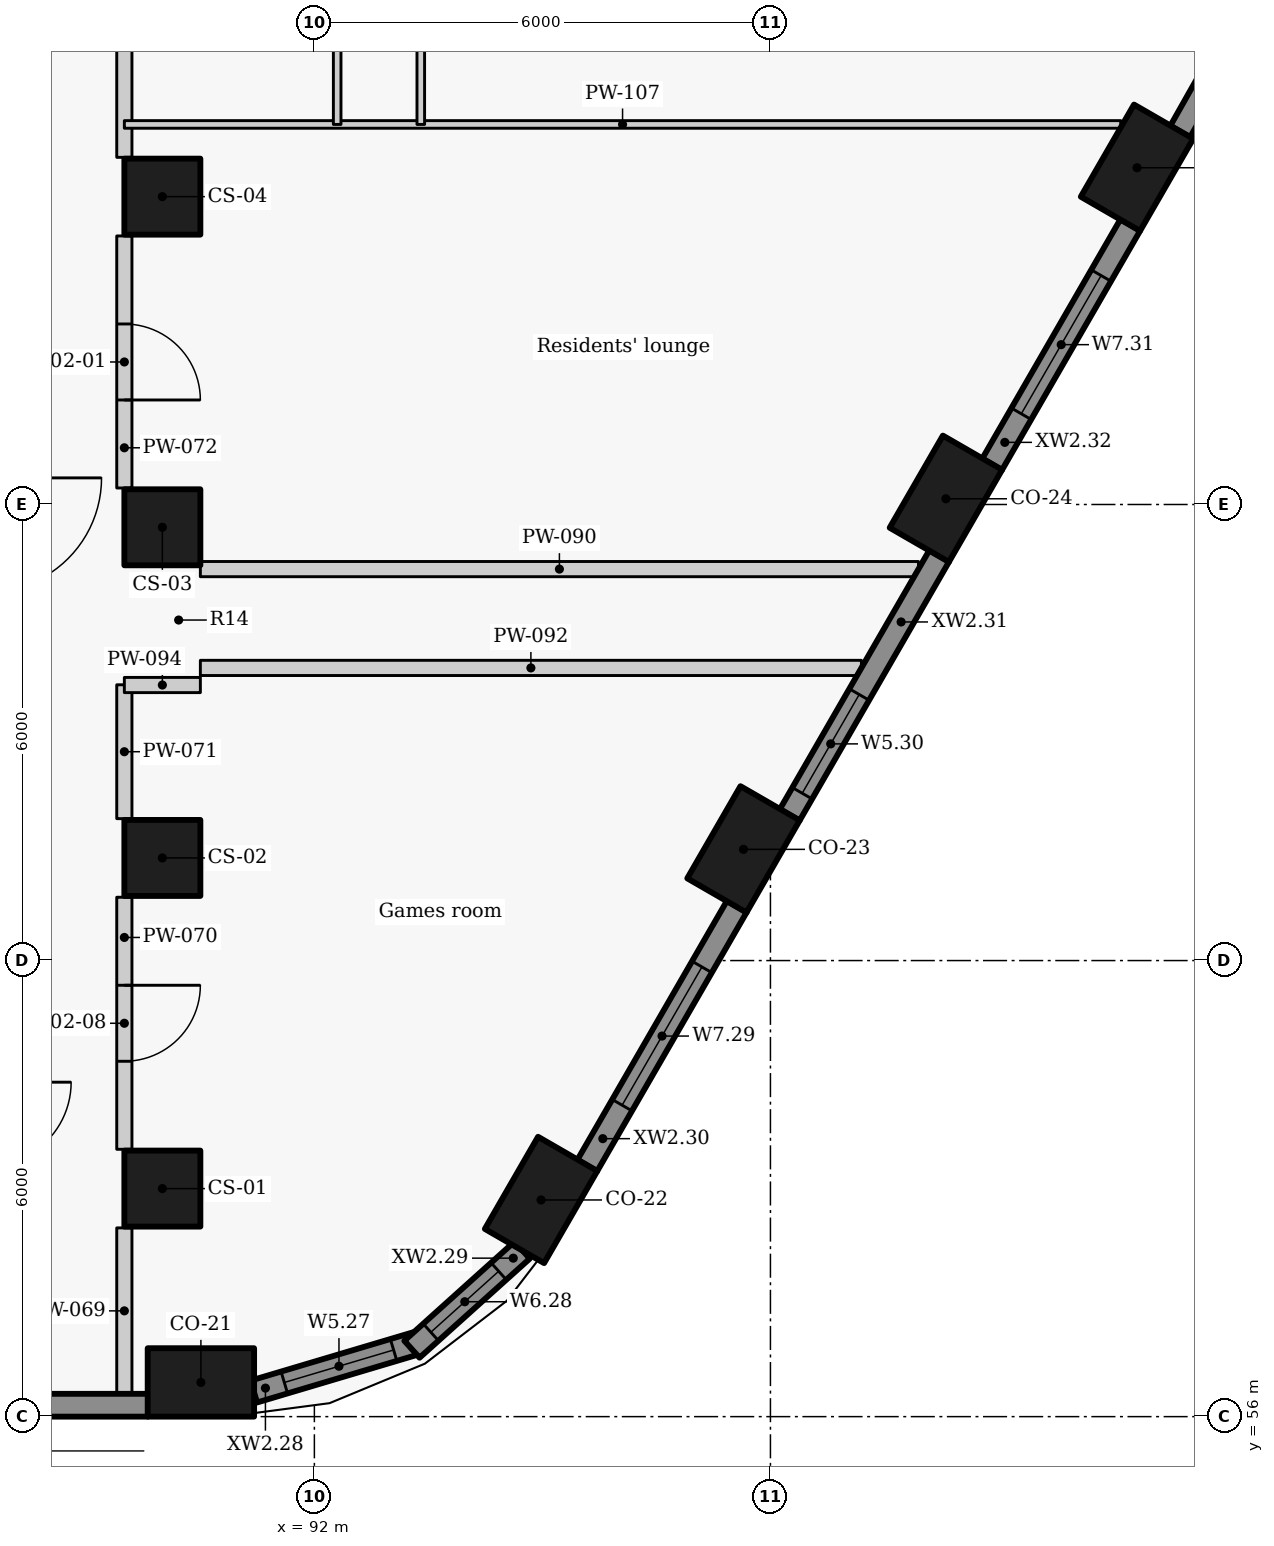
"""IFC4 building model, lengths in metres.
Left out: names, types, materials, properties, quantities, classifications, styles, units other than length and angle.
Written with IfcOpenShell. Run it as: python <this file> out.ifc"""

import sys

from ifc_helpers import new_model, si_unit, direction, frame, frame_2d, origin, origin_2d, place, context, subcontext, project, spatial, rectangle, extrude, element, fill, save


model = new_model("IFC4")
c1 = context("Model", 3, precision=1e-05, world=origin(), true_north=direction((0.0, 1.0)))
c2 = subcontext(c1, "Body", "Model", "MODEL_VIEW")
j1 = project(units=[si_unit("LENGTHUNIT", "METRE"), si_unit("PLANEANGLEUNIT", "RADIAN")], contexts=[c1])
p1 = place(None, origin())
s1 = spatial("IfcSite", under=j1, at=p1, CompositionType="ELEMENT")
p2 = place(p1, origin())
s2 = spatial("IfcBuilding", under=s1, at=p2, CompositionType="ELEMENT")
p3 = place(p2, frame((0.0, 0.0, 77.7)))
s3 = spatial("IfcBuildingStorey", under=s2, at=p3, CompositionType="ELEMENT", Elevation=77.7)
for number, where, z_axis, x_axis in (
    (1, (90.507, 56.45, 0.0), (0.0, 0.0, 1.0), (1.0, 0.0, 0.0)),
    (2, (94.982, 58.851, 0.0), (0.0, 0.0, 1.0), (0.5, 0.866, 0.0)),
    (3, (97.646, 63.463, 0.0), (0.0, 0.0, 1.0), (0.5, 0.866, 0.0)),
    (4, (100.308, 68.075, 0.0), (0.0, 0.0, 1.0), (0.5, 0.866, 0.0)),
    (5, (102.823, 72.43, 0.0), (0.0, 0.0, 1.0), (0.5, 0.866, 0.0)),
):
    element("IfcColumn", number, at=place(p3, frame(where, z_axis=z_axis, x_axis=x_axis)), inside=s3, PredefinedType="COLUMN", context=c2, shape_type="SweptSolid", body=[
        extrude(rectangle(XDim=1.4, YDim=0.9, at=origin_2d()), origin(), (0.0, 0.0, 1.0), 3.3),
    ])
for number, where, z_axis, x_axis in (
    (6, (90.0, 59.0, 0.0), (0.0, 0.0, 1.0), (0.0, 1.0, 0.0)),
    (7, (90.0, 63.35, 0.0), (0.0, 0.0, 1.0), (0.0, 1.0, 0.0)),
    (8, (90.0, 67.7, 0.0), (0.0, 0.0, 1.0), (0.0, 1.0, 0.0)),
    (9, (90.0, 72.05, 0.0), (0.0, 0.0, 1.0), (0.0, 1.0, 0.0)),
):
    element("IfcColumn", number, at=place(p3, frame(where, z_axis=z_axis, x_axis=x_axis)), inside=s3, PredefinedType="COLUMN", context=c2, shape_type="SweptSolid", body=[
        extrude(rectangle(XDim=1.0, YDim=1.0, at=origin_2d()), origin(), (0.0, 0.0, 1.0), 3.3),
    ])
p4 = place(p3, frame((69.871, 56.15, 0.0), z_axis=(0.0, 0.0, 1.0), x_axis=(1.0, 0.0, 0.0)))
e10 = element("IfcWall", 10, at=p4, inside=s3, PredefinedType="SOLIDWALL", context=c2, shape_type="SweptSolid", body=[
    extrude(rectangle(XDim=19.94, YDim=0.3, at=frame_2d((9.97, 0.0))), origin(), (0.0, 0.0, 1.0), 2.425),
])
p5 = place(p3, frame((91.203, 56.33, 0.0), z_axis=(0.0, 0.0, 1.0), x_axis=(0.95847736903, 0.285168604614, 0.0)))
e11 = element("IfcWall", 11, at=p5, inside=s3, PredefinedType="SOLIDWALL", context=c2, shape_type="SweptSolid", body=[
    extrude(rectangle(XDim=2.262, YDim=0.3, at=frame_2d((1.131, 0.0))), origin(), (0.0, 0.0, 1.0), 2.425),
])
p6 = place(p5, frame((0.419, 0.0, 0.9)))
e12 = element("IfcOpeningElement", 12, at=p6, cuts=e11, PredefinedType="OPENING", context=c2, shape_type="SweptSolid", body=[
    extrude(rectangle(XDim=1.5, YDim=1.1, at=frame_2d((0.75, 0.55))), frame((0.0, 0.16, 0.0), z_axis=(0.0, -1.0, 0.0), x_axis=(1.0, 0.0, 0.0)), (0.0, 0.0, 1.0), 0.32),
])
p7 = place(p3, frame((93.283, 56.887, 0.0), z_axis=(0.0, 0.0, 1.0), x_axis=(0.743785734967, 0.668418117992, 0.0)))
e13 = element("IfcWall", 13, at=p7, inside=s3, PredefinedType="SOLIDWALL", context=c2, shape_type="SweptSolid", body=[
    extrude(rectangle(XDim=1.95, YDim=0.3, at=frame_2d((0.975, 0.0))), origin(), (0.0, 0.0, 1.0), 2.425),
])
p8 = place(p7, frame((0.335, 0.0, 0.9)))
e14 = element("IfcOpeningElement", 14, at=p8, cuts=e13, PredefinedType="OPENING", context=c2, shape_type="SweptSolid", body=[
    extrude(rectangle(XDim=1.2, YDim=1.1, at=frame_2d((0.6, 0.55))), frame((0.0, 0.16, 0.0), z_axis=(0.0, -1.0, 0.0), x_axis=(1.0, 0.0, 0.0)), (0.0, 0.0, 1.0), 0.32),
])
p9 = place(p3, frame((95.59, 59.303, 0.0), z_axis=(0.0, 0.0, 1.0), x_axis=(0.500003583557, 0.866023334807, 0.0)))
e15 = element("IfcWall", 15, at=p9, inside=s3, PredefinedType="SOLIDWALL", context=c2, shape_type="SweptSolid", body=[
    extrude(rectangle(XDim=3.934, YDim=0.3, at=frame_2d((1.967, 0.0))), origin(), (0.0, 0.0, 1.0), 2.425),
])
p10 = place(p9, frame((0.917, 0.0, 0.9)))
e16 = element("IfcOpeningElement", 16, at=p10, cuts=e15, PredefinedType="OPENING", context=c2, shape_type="SweptSolid", body=[
    extrude(rectangle(XDim=2.1, YDim=1.1, at=frame_2d((1.05, 0.55))), frame((0.0, 0.16, 0.0), z_axis=(0.0, -1.0, 0.0), x_axis=(1.0, 0.0, 0.0)), (0.0, 0.0, 1.0), 0.32),
])
p11 = place(p3, frame((98.253, 63.916, 0.0), z_axis=(0.0, 0.0, 1.0), x_axis=(0.499957037901, 0.866050206543, 0.0)))
e17 = element("IfcWall", 17, at=p11, inside=s3, PredefinedType="SOLIDWALL", context=c2, shape_type="SweptSolid", body=[
    extrude(rectangle(XDim=3.934, YDim=0.3, at=frame_2d((1.967, 0.0))), origin(), (0.0, 0.0, 1.0), 2.425),
])
p12 = place(p11, frame((0.33, 0.0, 0.9)))
e18 = element("IfcOpeningElement", 18, at=p12, cuts=e17, PredefinedType="OPENING", context=c2, shape_type="SweptSolid", body=[
    extrude(rectangle(XDim=1.5, YDim=1.1, at=frame_2d((0.75, 0.55))), frame((0.0, 0.16, 0.0), z_axis=(0.0, -1.0, 0.0), x_axis=(1.0, 0.0, 0.0)), (0.0, 0.0, 1.0), 0.32),
])
p13 = place(p3, frame((100.916, 68.528, 0.0), z_axis=(0.0, 0.0, 1.0), x_axis=(0.500009139881, 0.866020126807, 0.0)))
e19 = element("IfcWall", 19, at=p13, inside=s3, PredefinedType="SOLIDWALL", context=c2, shape_type="SweptSolid", body=[
    extrude(rectangle(XDim=3.637, YDim=0.3, at=frame_2d((1.818, 0.0))), origin(), (0.0, 0.0, 1.0), 2.425),
])
p14 = place(p13, frame((0.768, 0.0, 0.9)))
e20 = element("IfcOpeningElement", 20, at=p14, cuts=e19, PredefinedType="OPENING", context=c2, shape_type="SweptSolid", body=[
    extrude(rectangle(XDim=2.1, YDim=1.1, at=frame_2d((1.05, 0.55))), frame((0.0, 0.16, 0.0), z_axis=(0.0, -1.0, 0.0), x_axis=(1.0, 0.0, 0.0)), (0.0, 0.0, 1.0), 0.32),
])
p15 = place(p3, frame((103.391, 72.906, 0.0), z_axis=(0.0, 0.0, 1.0), x_axis=(0.492456858874, 0.870336855561, 0.0)))
e21 = element("IfcWall", 21, at=p15, inside=s3, PredefinedType="SOLIDWALL", context=c2, shape_type="SweptSolid", body=[
    extrude(rectangle(XDim=5.677, YDim=0.3, at=frame_2d((2.838, 0.0))), origin(), (0.0, 0.0, 1.0), 2.425),
])
p16 = place(p15, frame((1.498, 0.0, 0.9)))
e22 = element("IfcOpeningElement", 22, at=p16, cuts=e21, PredefinedType="OPENING", context=c2, shape_type="SweptSolid", body=[
    extrude(rectangle(XDim=2.1, YDim=1.1, at=frame_2d((1.05, 0.55))), frame((0.0, 0.16, 0.0), z_axis=(0.0, -1.0, 0.0), x_axis=(1.0, 0.0, 0.0)), (0.0, 0.0, 1.0), 0.32),
])
p17 = place(p3, frame((89.5, 56.3, 0.0), z_axis=(0.0, 0.0, 1.0), x_axis=(0.0, 1.0, 0.0)))
e23 = element("IfcWall", 23, at=p17, inside=s3, PredefinedType="PARTITIONING", context=c2, shape_type="SweptSolid", body=[
    extrude(rectangle(XDim=2.183, YDim=0.2, at=frame_2d((1.091, 0.0))), origin(), (0.0, 0.0, 1.0), 3.025),
])
p18 = place(p3, frame((89.5, 62.833, 0.0), z_axis=(0.0, 0.0, 1.0), x_axis=(0.0, -1.0, 0.0)))
e24 = element("IfcWall", 24, at=p18, inside=s3, PredefinedType="PARTITIONING", context=c2, shape_type="SweptSolid", body=[
    extrude(rectangle(XDim=3.316, YDim=0.2, at=frame_2d((1.658, 0.0))), origin(), (0.0, 0.0, 1.0), 3.025),
])
p19 = place(p18, frame((1.158, 0.0, 0.0)))
e25 = element("IfcOpeningElement", 25, at=p19, cuts=e24, PredefinedType="OPENING", context=c2, shape_type="SweptSolid", body=[
    extrude(rectangle(XDim=1.0, YDim=2.1, at=frame_2d((0.5, 1.05))), frame((0.0, 0.11, 0.0), z_axis=(0.0, -1.0, 0.0), x_axis=(1.0, 0.0, 0.0)), (0.0, 0.0, 1.0), 0.22),
])
p20 = place(p3, frame((89.5, 63.867, 0.0), z_axis=(0.0, 0.0, 1.0), x_axis=(0.0, 1.0, 0.0)))
e26 = element("IfcWall", 26, at=p20, inside=s3, PredefinedType="PARTITIONING", context=c2, shape_type="SweptSolid", body=[
    extrude(rectangle(XDim=1.761, YDim=0.2, at=frame_2d((0.88, 0.0))), origin(), (0.0, 0.0, 1.0), 3.025),
])
p21 = place(p3, frame((89.5, 71.533, 0.0), z_axis=(0.0, 0.0, 1.0), x_axis=(0.0, -1.0, 0.0)))
e27 = element("IfcWall", 27, at=p21, inside=s3, PredefinedType="PARTITIONING", context=c2, shape_type="SweptSolid", body=[
    extrude(rectangle(XDim=3.316, YDim=0.2, at=frame_2d((1.658, 0.0))), origin(), (0.0, 0.0, 1.0), 3.025),
])
p22 = place(p21, frame((1.158, 0.0, 0.0)))
e28 = element("IfcOpeningElement", 28, at=p22, cuts=e27, PredefinedType="OPENING", context=c2, shape_type="SweptSolid", body=[
    extrude(rectangle(XDim=1.0, YDim=2.1, at=frame_2d((0.5, 1.05))), frame((0.0, 0.11, 0.0), z_axis=(0.0, -1.0, 0.0), x_axis=(1.0, 0.0, 0.0)), (0.0, 0.0, 1.0), 0.22),
])
p23 = place(p3, frame((89.5, 72.567, 0.0), z_axis=(0.0, 0.0, 1.0), x_axis=(0.0, 1.0, 0.0)))
e29 = element("IfcWall", 29, at=p23, inside=s3, PredefinedType="PARTITIONING", context=c2, shape_type="SweptSolid", body=[
    extrude(rectangle(XDim=4.266, YDim=0.2, at=frame_2d((2.133, 0.0))), origin(), (0.0, 0.0, 1.0), 3.025),
])
p24 = place(p3, frame((90.5, 67.15, 0.0), z_axis=(0.0, 0.0, 1.0), x_axis=(1.0, 0.0, 0.0)))
e30 = element("IfcWall", 30, at=p24, inside=s3, PredefinedType="PARTITIONING", context=c2, shape_type="SweptSolid", body=[
    extrude(rectangle(XDim=9.448, YDim=0.2, at=frame_2d((4.724, 0.0))), origin(), (0.0, 0.0, 1.0), 2.405),
])
p25 = place(p3, frame((90.5, 65.85, 0.0), z_axis=(0.0, 0.0, 1.0), x_axis=(1.0, 0.0, 0.0)))
e31 = element("IfcWall", 31, at=p25, inside=s3, PredefinedType="PARTITIONING", context=c2, shape_type="SweptSolid", body=[
    extrude(rectangle(XDim=8.697, YDim=0.2, at=frame_2d((4.349, 0.0))), origin(), (0.0, 0.0, 1.0), 2.405),
])
p26 = place(p3, frame((89.5, 65.625, 0.0), z_axis=(0.0, 0.0, 1.0), x_axis=(1.0, 0.0, 0.0)))
e32 = element("IfcWall", 32, at=p26, inside=s3, PredefinedType="PARTITIONING", context=c2, shape_type="SweptSolid", body=[
    extrude(rectangle(XDim=1.0, YDim=0.2, at=frame_2d((0.5, 0.0))), origin(), (0.0, 0.0, 1.0), 2.505),
])
p27 = place(p3, frame((89.5, 73.0, 0.0), z_axis=(0.0, 0.0, 1.0), x_axis=(1.0, 0.0, 0.0)))
e33 = element("IfcWall", 33, at=p27, inside=s3, PredefinedType="PARTITIONING", context=c2, shape_type="SweptSolid", body=[
    extrude(rectangle(XDim=13.109, YDim=0.1, at=frame_2d((6.555, 0.0))), origin(), (0.0, 0.0, 1.0), 2.505),
])
p28 = place(p3, frame((92.3, 73.0, 0.0), z_axis=(0.0, 0.0, 1.0), x_axis=(0.0, 1.0, 0.0)))
e34 = element("IfcWall", 34, at=p28, inside=s3, PredefinedType="PARTITIONING", context=c2, shape_type="SweptSolid", body=[
    extrude(rectangle(XDim=7.4, YDim=0.1, at=frame_2d((3.7, 0.0))), origin(), (0.0, 0.0, 1.0), 3.025),
])
p29 = place(p28, frame((1.568, 0.0, 0.0)))
e35 = element("IfcOpeningElement", 35, at=p29, cuts=e34, PredefinedType="OPENING", context=c2, shape_type="SweptSolid", body=[
    extrude(rectangle(XDim=0.9, YDim=2.1, at=frame_2d((0.45, 1.05))), frame((0.0, 0.06, 0.0), z_axis=(0.0, -1.0, 0.0), x_axis=(1.0, 0.0, 0.0)), (0.0, 0.0, 1.0), 0.12),
])
p30 = place(p28, frame((5.293, 0.0, 0.0)))
e36 = element("IfcOpeningElement", 36, at=p30, cuts=e34, PredefinedType="OPENING", context=c2, shape_type="SweptSolid", body=[
    extrude(rectangle(XDim=0.85, YDim=2.1, at=frame_2d((0.425, 1.05))), frame((0.0, 0.06, 0.0), z_axis=(0.0, -1.0, 0.0), x_axis=(1.0, 0.0, 0.0)), (0.0, 0.0, 1.0), 0.12),
])
p31 = place(p3, frame((93.4, 93.55, 0.0), z_axis=(0.0, 0.0, 1.0), x_axis=(0.0, -1.0, 0.0)))
e37 = element("IfcWall", 37, at=p31, inside=s3, PredefinedType="PARTITIONING", context=c2, shape_type="SweptSolid", body=[
    extrude(rectangle(XDim=20.55, YDim=0.1, at=frame_2d((10.275, 0.0))), origin(), (0.0, 0.0, 1.0), 3.025),
])
p32 = place(p31, frame((17.898, 0.0, 0.0)))
e38 = element("IfcOpeningElement", 38, at=p32, cuts=e37, PredefinedType="OPENING", context=c2, shape_type="SweptSolid", body=[
    extrude(rectangle(XDim=0.9, YDim=2.1, at=frame_2d((0.45, 1.05))), frame((0.0, 0.06, 0.0), z_axis=(0.0, -1.0, 0.0), x_axis=(1.0, 0.0, 0.0)), (0.0, 0.0, 1.0), 0.12),
])
p33 = place(p31, frame((14.173, 0.0, 0.0)))
e39 = element("IfcOpeningElement", 39, at=p33, cuts=e37, PredefinedType="OPENING", context=c2, shape_type="SweptSolid", body=[
    extrude(rectangle(XDim=0.9, YDim=2.1, at=frame_2d((0.45, 1.05))), frame((0.0, 0.06, 0.0), z_axis=(0.0, -1.0, 0.0), x_axis=(1.0, 0.0, 0.0)), (0.0, 0.0, 1.0), 0.12),
])
p34 = place(p31, frame((11.124, 0.0, 0.0)))
e40 = element("IfcOpeningElement", 40, at=p34, cuts=e37, PredefinedType="OPENING", context=c2, shape_type="SweptSolid", body=[
    extrude(rectangle(XDim=0.9, YDim=2.1, at=frame_2d((0.45, 1.05))), frame((0.0, 0.06, 0.0), z_axis=(0.0, -1.0, 0.0), x_axis=(1.0, 0.0, 0.0)), (0.0, 0.0, 1.0), 0.12),
])
p35 = place(p31, frame((8.141, 0.0, 0.0)))
e41 = element("IfcOpeningElement", 41, at=p35, cuts=e37, PredefinedType="OPENING", context=c2, shape_type="SweptSolid", body=[
    extrude(rectangle(XDim=0.9, YDim=2.1, at=frame_2d((0.45, 1.05))), frame((0.0, 0.06, 0.0), z_axis=(0.0, -1.0, 0.0), x_axis=(1.0, 0.0, 0.0)), (0.0, 0.0, 1.0), 0.12),
])
p36 = place(p31, frame((5.223, 0.0, 0.0)))
e42 = element("IfcOpeningElement", 42, at=p36, cuts=e37, PredefinedType="OPENING", context=c2, shape_type="SweptSolid", body=[
    extrude(rectangle(XDim=0.9, YDim=2.1, at=frame_2d((0.45, 1.05))), frame((0.0, 0.06, 0.0), z_axis=(0.0, -1.0, 0.0), x_axis=(1.0, 0.0, 0.0)), (0.0, 0.0, 1.0), 0.12),
])
p37 = place(p31, frame((1.657, 0.0, 0.0)))
e43 = element("IfcOpeningElement", 43, at=p37, cuts=e37, PredefinedType="OPENING", context=c2, shape_type="SweptSolid", body=[
    extrude(rectangle(XDim=0.9, YDim=2.1, at=frame_2d((0.45, 1.05))), frame((0.0, 0.06, 0.0), z_axis=(0.0, -1.0, 0.0), x_axis=(1.0, 0.0, 0.0)), (0.0, 0.0, 1.0), 0.12),
])
p38 = place(p6, origin())
e44 = element("IfcWindow", 44, at=p38, inside=s3, PartitioningType="SINGLE_PANEL", PredefinedType="WINDOW", context=c2, shape_type="SweptSolid", body=[
    extrude(rectangle(XDim=1.5, YDim=1.1, at=frame_2d((0.75, 0.55))), frame((0.0, 0.03, 0.0), z_axis=(0.0, -1.0, 0.0), x_axis=(1.0, 0.0, 0.0)), (0.0, 0.0, 1.0), 0.06),
])
fill(e12, e44)
p39 = place(p8, origin())
e45 = element("IfcWindow", 45, at=p39, inside=s3, PartitioningType="SINGLE_PANEL", PredefinedType="WINDOW", context=c2, shape_type="SweptSolid", body=[
    extrude(rectangle(XDim=1.2, YDim=1.1, at=frame_2d((0.6, 0.55))), frame((0.0, 0.03, 0.0), z_axis=(0.0, -1.0, 0.0), x_axis=(1.0, 0.0, 0.0)), (0.0, 0.0, 1.0), 0.06),
])
fill(e14, e45)
p40 = place(p10, origin())
e46 = element("IfcWindow", 46, at=p40, inside=s3, PartitioningType="SINGLE_PANEL", PredefinedType="WINDOW", context=c2, shape_type="SweptSolid", body=[
    extrude(rectangle(XDim=2.1, YDim=1.1, at=frame_2d((1.05, 0.55))), frame((0.0, 0.03, 0.0), z_axis=(0.0, -1.0, 0.0), x_axis=(1.0, 0.0, 0.0)), (0.0, 0.0, 1.0), 0.06),
])
fill(e16, e46)
p41 = place(p12, origin())
e47 = element("IfcWindow", 47, at=p41, inside=s3, PartitioningType="SINGLE_PANEL", PredefinedType="WINDOW", context=c2, shape_type="SweptSolid", body=[
    extrude(rectangle(XDim=1.5, YDim=1.1, at=frame_2d((0.75, 0.55))), frame((0.0, 0.03, 0.0), z_axis=(0.0, -1.0, 0.0), x_axis=(1.0, 0.0, 0.0)), (0.0, 0.0, 1.0), 0.06),
])
fill(e18, e47)
p42 = place(p14, origin())
e48 = element("IfcWindow", 48, at=p42, inside=s3, PartitioningType="SINGLE_PANEL", PredefinedType="WINDOW", context=c2, shape_type="SweptSolid", body=[
    extrude(rectangle(XDim=2.1, YDim=1.1, at=frame_2d((1.05, 0.55))), frame((0.0, 0.03, 0.0), z_axis=(0.0, -1.0, 0.0), x_axis=(1.0, 0.0, 0.0)), (0.0, 0.0, 1.0), 0.06),
])
fill(e20, e48)
p43 = place(p22, origin())
e49 = element("IfcDoor", 49, at=p43, inside=s3, OperationType="SINGLE_SWING_RIGHT", PredefinedType="DOOR", context=c2, shape_type="SweptSolid", body=[
    extrude(rectangle(XDim=1.0, YDim=2.1, at=frame_2d((0.5, 1.05))), frame((0.0, 0.025, 0.0), z_axis=(0.0, -1.0, 0.0), x_axis=(1.0, 0.0, 0.0)), (0.0, 0.0, 1.0), 0.05),
])
fill(e28, e49)
p44 = place(p19, origin())
e50 = element("IfcDoor", 50, at=p44, inside=s3, OperationType="SINGLE_SWING_LEFT", PredefinedType="DOOR", context=c2, shape_type="SweptSolid", body=[
    extrude(rectangle(XDim=1.0, YDim=2.1, at=frame_2d((0.5, 1.05))), frame((0.0, 0.025, 0.0), z_axis=(0.0, -1.0, 0.0), x_axis=(1.0, 0.0, 0.0)), (0.0, 0.0, 1.0), 0.05),
])
fill(e25, e50)
save(model, sys.argv[1])
